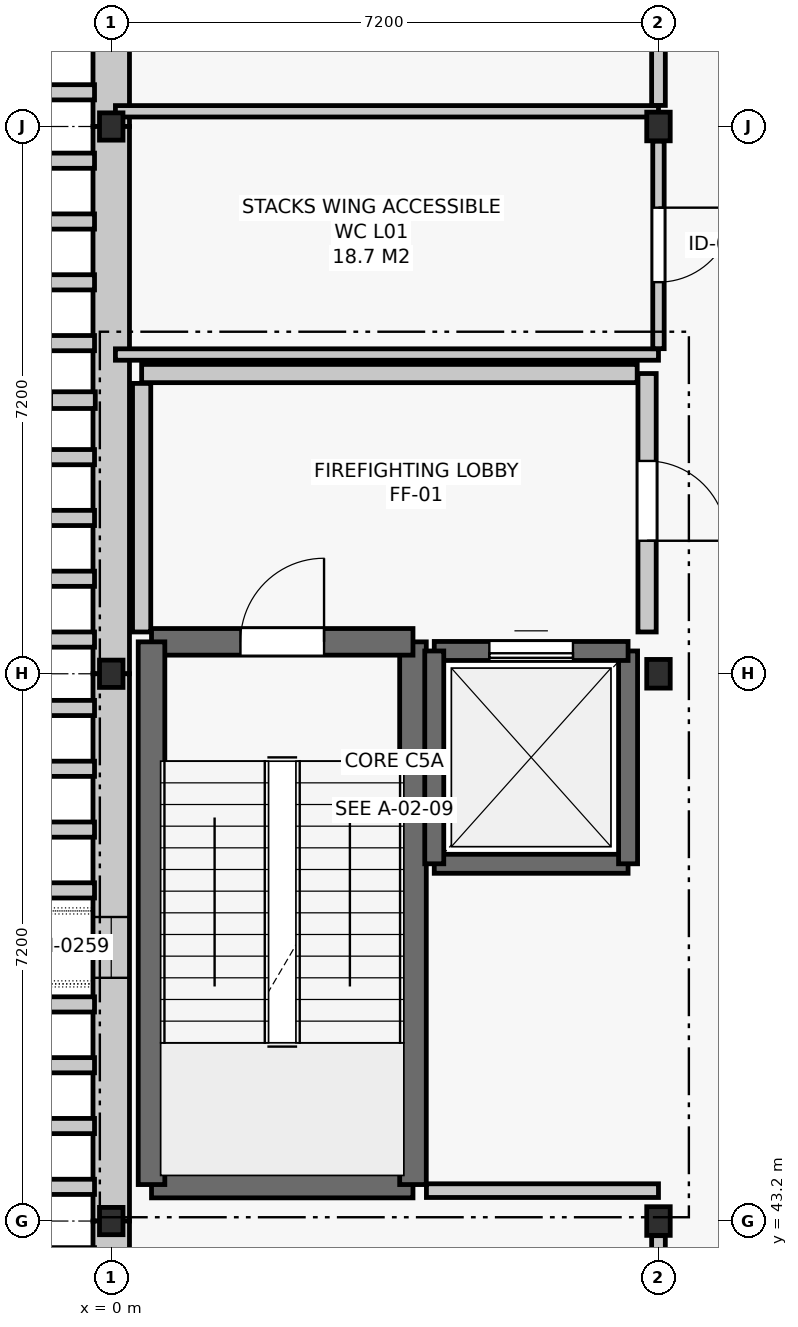
"""IFC4 building model, lengths in metres.
Left out: names, types, materials, properties, quantities, classifications, styles, units other than length and angle.
Written with IfcOpenShell. Run it as: python <this file> out.ifc"""

import sys

from ifc_helpers import new_model, si_unit, direction, frame, frame_2d, origin, origin_2d, place, context, subcontext, project, spatial, rectangle, i_section, extrude, element, fill, save


model = new_model("IFC4")
c1 = context("Model", 3, precision=1e-05, world=origin(), true_north=direction((0.0, 1.0)))
c2 = subcontext(c1, "Body", "Model", "MODEL_VIEW")
j1 = project(units=[si_unit("LENGTHUNIT", "METRE"), si_unit("PLANEANGLEUNIT", "RADIAN")], contexts=[c1])
p1 = place(None, origin())
s1 = spatial("IfcSite", under=j1, at=p1, CompositionType="ELEMENT")
p2 = place(p1, origin())
s2 = spatial("IfcBuilding", under=s1, at=p2, CompositionType="ELEMENT")
p3 = place(p2, frame((0.0, 0.0, 5.4)))
s3 = spatial("IfcBuildingStorey", under=s2, at=p3, CompositionType="ELEMENT", Elevation=5.4)
for number, where, z_axis, x_axis in (
    (1, (0.0, 43.2, 0.0), (0.0, 0.0, 1.0), (1.0, 0.0, 0.0)),
    (2, (0.0, 50.4, 0.0), (0.0, 0.0, 1.0), (1.0, 0.0, 0.0)),
    (3, (0.0, 57.6, 0.0), (0.0, 0.0, 1.0), (1.0, 0.0, 0.0)),
):
    element("IfcColumn", number, at=place(p3, frame(where, z_axis=z_axis, x_axis=x_axis)), inside=s3, PredefinedType="COLUMN", context=c2, shape_type="SweptSolid", body=[
        extrude(i_section(OverallWidth=0.309, OverallDepth=0.359, WebThickness=0.021, FlangeThickness=0.035, FilletRadius=0.027, at=origin_2d()), origin(), (0.0, 0.0, 1.0), 4.8),
    ])
for number, where, z_axis, x_axis in (
    (4, (7.2, 43.2, 0.0), (0.0, 0.0, 1.0), (1.0, 0.0, 0.0)),
    (5, (7.2, 50.4, 0.0), (0.0, 0.0, 1.0), (1.0, 0.0, 0.0)),
    (6, (7.2, 57.6, 0.0), (0.0, 0.0, 1.0), (1.0, 0.0, 0.0)),
):
    element("IfcColumn", number, at=place(p3, frame(where, z_axis=z_axis, x_axis=x_axis)), inside=s3, PredefinedType="COLUMN", context=c2, shape_type="SweptSolid", body=[
        extrude(i_section(OverallWidth=0.309, OverallDepth=0.377, WebThickness=0.021, FlangeThickness=0.036, FilletRadius=0.027, at=origin_2d()), origin(), (0.0, 0.0, 1.0), 4.8),
    ])
p4 = place(p3, frame((0.0, 64.8, 0.0), z_axis=(0.0, 0.0, 1.0), x_axis=(0.0, -1.0, 0.0)))
e7 = element("IfcWall", 7, at=p4, inside=s3, PredefinedType="SOLIDWALL", context=c2, shape_type="SweptSolid", body=[
    extrude(rectangle(XDim=7.2, YDim=0.48, at=frame_2d((3.6, 0.0))), origin(), (0.0, 0.0, 1.0), 3.62),
])
p5 = place(p4, frame((3.2, 0.0, 0.95)))
e8 = element("IfcOpeningElement", 8, at=p5, cuts=e7, PredefinedType="OPENING", context=c2, shape_type="SweptSolid", body=[
    extrude(rectangle(XDim=0.8, YDim=2.15, at=frame_2d((0.4, 1.075))), frame((0.0, 0.252, 0.0), z_axis=(0.0, -1.0, 0.0), x_axis=(1.0, 0.0, 0.0)), (0.0, 0.0, 1.0), 0.504),
])
p6 = place(p3, frame((0.0, 57.6, 0.0), z_axis=(0.0, 0.0, 1.0), x_axis=(0.0, -1.0, 0.0)))
e9 = element("IfcWall", 9, at=p6, inside=s3, PredefinedType="SOLIDWALL", context=c2, shape_type="SweptSolid", body=[
    extrude(rectangle(XDim=7.2, YDim=0.48, at=frame_2d((3.6, 0.0))), origin(), (0.0, 0.0, 1.0), 3.62),
])
p7 = place(p3, frame((0.0, 50.4, 0.0), z_axis=(0.0, 0.0, 1.0), x_axis=(0.0, -1.0, 0.0)))
e10 = element("IfcWall", 10, at=p7, inside=s3, PredefinedType="SOLIDWALL", context=c2, shape_type="SweptSolid", body=[
    extrude(rectangle(XDim=7.2, YDim=0.48, at=frame_2d((3.6, 0.0))), origin(), (0.0, 0.0, 1.0), 3.62),
])
p8 = place(p7, frame((3.2, 0.0, 0.95)))
e11 = element("IfcOpeningElement", 11, at=p8, cuts=e10, PredefinedType="OPENING", context=c2, shape_type="SweptSolid", body=[
    extrude(rectangle(XDim=0.8, YDim=2.15, at=frame_2d((0.4, 1.075))), frame((0.0, 0.252, 0.0), z_axis=(0.0, -1.0, 0.0), x_axis=(1.0, 0.0, 0.0)), (0.0, 0.0, 1.0), 0.504),
])
p9 = place(p3, frame((0.0, 43.2, 0.0), z_axis=(0.0, 0.0, 1.0), x_axis=(0.0, -1.0, 0.0)))
e12 = element("IfcWall", 12, at=p9, inside=s3, PredefinedType="SOLIDWALL", context=c2, shape_type="SweptSolid", body=[
    extrude(rectangle(XDim=7.2, YDim=0.48, at=frame_2d((3.6, 0.0))), origin(), (0.0, 0.0, 1.0), 3.62),
])
p10 = place(p9, frame((3.2, 0.0, 0.95)))
e13 = element("IfcOpeningElement", 13, at=p10, cuts=e12, PredefinedType="OPENING", context=c2, shape_type="SweptSolid", body=[
    extrude(rectangle(XDim=0.8, YDim=2.15, at=frame_2d((0.4, 1.075))), frame((0.0, 0.252, 0.0), z_axis=(0.0, -1.0, 0.0), x_axis=(1.0, 0.0, 0.0)), (0.0, 0.0, 1.0), 0.504),
])
for number, where, z_axis, x_axis in (
    (14, (-1.66, 43.65, 0.0), (0.0, 0.0, 1.0), (1.0, 0.0, 0.0)),
    (15, (-1.66, 44.45, 0.0), (0.0, 0.0, 1.0), (1.0, 0.0, 0.0)),
    (16, (-1.66, 45.25, 0.0), (0.0, 0.0, 1.0), (1.0, 0.0, 0.0)),
    (17, (-1.66, 46.05, 0.0), (0.0, 0.0, 1.0), (1.0, 0.0, 0.0)),
    (18, (-1.66, 47.55, 0.0), (0.0, 0.0, 1.0), (1.0, 0.0, 0.0)),
    (19, (-1.66, 48.35, 0.0), (0.0, 0.0, 1.0), (1.0, 0.0, 0.0)),
    (20, (-1.66, 49.15, 0.0), (0.0, 0.0, 1.0), (1.0, 0.0, 0.0)),
    (21, (-1.66, 49.95, 0.0), (0.0, 0.0, 1.0), (1.0, 0.0, 0.0)),
    (22, (-1.66, 50.85, 0.0), (0.0, 0.0, 1.0), (1.0, 0.0, 0.0)),
    (23, (-1.66, 51.65, 0.0), (0.0, 0.0, 1.0), (1.0, 0.0, 0.0)),
    (24, (-1.66, 52.45, 0.0), (0.0, 0.0, 1.0), (1.0, 0.0, 0.0)),
    (25, (-1.66, 53.25, 0.0), (0.0, 0.0, 1.0), (1.0, 0.0, 0.0)),
    (26, (-1.66, 54.75, 0.0), (0.0, 0.0, 1.0), (1.0, 0.0, 0.0)),
    (27, (-1.66, 55.55, 0.0), (0.0, 0.0, 1.0), (1.0, 0.0, 0.0)),
    (28, (-1.66, 56.35, 0.0), (0.0, 0.0, 1.0), (1.0, 0.0, 0.0)),
    (29, (-1.66, 57.15, 0.0), (0.0, 0.0, 1.0), (1.0, 0.0, 0.0)),
    (30, (-1.66, 58.05, 0.0), (0.0, 0.0, 1.0), (1.0, 0.0, 0.0)),
):
    element("IfcWall", number, at=place(p3, frame(where, z_axis=z_axis, x_axis=x_axis)), inside=s3, PredefinedType="SOLIDWALL", context=c2, shape_type="SweptSolid", body=[
        extrude(rectangle(XDim=1.44, YDim=0.2, at=frame_2d((0.72, 0.0))), origin(), (0.0, 0.0, 1.0), 4.8),
    ])
p11 = place(p3, frame((0.53, 43.68, 0.0), z_axis=(0.0, 0.0, 1.0), x_axis=(1.0, 0.0, 0.0)))
e31 = element("IfcWall", 31, at=p11, inside=s3, PredefinedType="SHEAR", context=c2, shape_type="SweptSolid", body=[
    extrude(rectangle(XDim=3.44, YDim=0.35, at=frame_2d((1.72, 0.0))), origin(), (0.0, 0.0, 1.0), 4.5),
])
p12 = place(p3, frame((3.97, 43.68, 0.0), z_axis=(0.0, 0.0, 1.0), x_axis=(0.0, 1.0, 0.0)))
e32 = element("IfcWall", 32, at=p12, inside=s3, PredefinedType="SHEAR", context=c2, shape_type="SweptSolid", body=[
    extrude(rectangle(XDim=7.14, YDim=0.35, at=frame_2d((3.57, 0.0))), origin(), (0.0, 0.0, 1.0), 4.5),
])
p13 = place(p3, frame((3.97, 50.82, 0.0), z_axis=(0.0, 0.0, 1.0), x_axis=(-1.0, 0.0, 0.0)))
e33 = element("IfcWall", 33, at=p13, inside=s3, PredefinedType="SHEAR", context=c2, shape_type="SweptSolid", body=[
    extrude(rectangle(XDim=3.44, YDim=0.35, at=frame_2d((1.72, 0.0))), origin(), (0.0, 0.0, 1.0), 4.5),
])
p14 = place(p13, frame((1.17, 0.0, 0.0)))
e34 = element("IfcOpeningElement", 34, at=p14, cuts=e33, PredefinedType="OPENING", context=c2, shape_type="SweptSolid", body=[
    extrude(rectangle(XDim=1.1, YDim=2.15, at=frame_2d((0.55, 1.075))), frame((0.0, 0.187, 0.0), z_axis=(0.0, -1.0, 0.0), x_axis=(1.0, 0.0, 0.0)), (0.0, 0.0, 1.0), 0.374),
])
p15 = place(p3, frame((0.53, 50.82, 0.0), z_axis=(0.0, 0.0, 1.0), x_axis=(0.0, -1.0, 0.0)))
e35 = element("IfcWall", 35, at=p15, inside=s3, PredefinedType="SHEAR", context=c2, shape_type="SweptSolid", body=[
    extrude(rectangle(XDim=7.14, YDim=0.35, at=frame_2d((3.57, 0.0))), origin(), (0.0, 0.0, 1.0), 4.5),
])
p16 = place(p3, frame((7.05, 50.95, 0.0), z_axis=(0.0, 0.0, 1.0), x_axis=(0.0, 1.0, 0.0)))
e36 = element("IfcWall", 36, at=p16, inside=s3, PredefinedType="SOLIDWALL", context=c2, shape_type="SweptSolid", body=[
    extrude(rectangle(XDim=3.4, YDim=0.24, at=frame_2d((1.7, 0.0))), origin(), (0.0, 0.0, 1.0), 3.76),
])
p17 = place(p16, frame((1.2, 0.0, 0.0)))
e37 = element("IfcOpeningElement", 37, at=p17, cuts=e36, PredefinedType="OPENING", context=c2, shape_type="SweptSolid", body=[
    extrude(rectangle(XDim=1.05, YDim=2.15, at=frame_2d((0.525, 1.075))), frame((0.0, 0.132, 0.0), z_axis=(0.0, -1.0, 0.0), x_axis=(1.0, 0.0, 0.0)), (0.0, 0.0, 1.0), 0.264),
])
p18 = place(p3, frame((0.4, 54.35, 0.0), z_axis=(0.0, 0.0, 1.0), x_axis=(1.0, 0.0, 0.0)))
e38 = element("IfcWall", 38, at=p18, inside=s3, PredefinedType="SOLIDWALL", context=c2, shape_type="SweptSolid", body=[
    extrude(rectangle(XDim=6.52, YDim=0.24, at=frame_2d((3.26, 0.0))), origin(), (0.0, 0.0, 1.0), 3.76),
])
p19 = place(p3, frame((0.4, 50.95, 0.0), z_axis=(0.0, 0.0, 1.0), x_axis=(0.0, 1.0, 0.0)))
e39 = element("IfcWall", 39, at=p19, inside=s3, PredefinedType="SOLIDWALL", context=c2, shape_type="SweptSolid", body=[
    extrude(rectangle(XDim=3.27, YDim=0.24, at=frame_2d((1.635, 0.0))), origin(), (0.0, 0.0, 1.0), 3.76),
])
p20 = place(p3, frame((4.25, 47.9, 0.0), z_axis=(0.0, 0.0, 1.0), x_axis=(1.0, 0.0, 0.0)))
e40 = element("IfcWall", 40, at=p20, inside=s3, PredefinedType="SHEAR", context=c2, shape_type="SweptSolid", body=[
    extrude(rectangle(XDim=2.55, YDim=0.25, at=frame_2d((1.275, 0.0))), origin(), (0.0, 0.0, 1.0), 4.5),
])
p21 = place(p3, frame((6.8, 47.9, 0.0), z_axis=(0.0, 0.0, 1.0), x_axis=(0.0, 1.0, 0.0)))
e41 = element("IfcWall", 41, at=p21, inside=s3, PredefinedType="SHEAR", context=c2, shape_type="SweptSolid", body=[
    extrude(rectangle(XDim=2.8, YDim=0.25, at=frame_2d((1.4, 0.0))), origin(), (0.0, 0.0, 1.0), 4.5),
])
p22 = place(p3, frame((6.8, 50.7, 0.0), z_axis=(0.0, 0.0, 1.0), x_axis=(-1.0, 0.0, 0.0)))
e42 = element("IfcWall", 42, at=p22, inside=s3, PredefinedType="SHEAR", context=c2, shape_type="SweptSolid", body=[
    extrude(rectangle(XDim=2.55, YDim=0.25, at=frame_2d((1.275, 0.0))), origin(), (0.0, 0.0, 1.0), 4.5),
])
p23 = place(p22, frame((0.725, 0.0, 0.0)))
e43 = element("IfcOpeningElement", 43, at=p23, cuts=e42, PredefinedType="OPENING", context=c2, shape_type="SweptSolid", body=[
    extrude(rectangle(XDim=1.1, YDim=2.1, at=frame_2d((0.55, 1.05))), frame((0.0, 0.137, 0.0), z_axis=(0.0, -1.0, 0.0), x_axis=(1.0, 0.0, 0.0)), (0.0, 0.0, 1.0), 0.274),
])
p24 = place(p3, frame((4.25, 50.7, 0.0), z_axis=(0.0, 0.0, 1.0), x_axis=(0.0, -1.0, 0.0)))
e44 = element("IfcWall", 44, at=p24, inside=s3, PredefinedType="SHEAR", context=c2, shape_type="SweptSolid", body=[
    extrude(rectangle(XDim=2.8, YDim=0.25, at=frame_2d((1.4, 0.0))), origin(), (0.0, 0.0, 1.0), 4.5),
])
for number, where, z_axis, x_axis in (
    (45, (0.055, 54.6, 0.0), (0.0, 0.0, 1.0), (1.0, 0.0, 0.0)),
    (46, (0.055, 57.8, 0.0), (0.0, 0.0, 1.0), (1.0, 0.0, 0.0)),
):
    element("IfcWall", number, at=place(p3, frame(where, z_axis=z_axis, x_axis=x_axis)), inside=s3, PredefinedType="PARTITIONING", context=c2, shape_type="SweptSolid", body=[
        extrude(rectangle(XDim=7.145, YDim=0.15, at=frame_2d((3.573, 0.0))), origin(), (0.0, 0.0, 1.0), 3.732),
    ])
p25 = place(p3, frame((4.147, 43.6, 0.0), z_axis=(0.0, 0.0, 1.0), x_axis=(1.0, 0.0, 0.0)))
e47 = element("IfcWall", 47, at=p25, inside=s3, PredefinedType="PARTITIONING", context=c2, shape_type="SweptSolid", body=[
    extrude(rectangle(XDim=3.053, YDim=0.18, at=frame_2d((1.526, 0.0))), origin(), (0.0, 0.0, 1.0), 3.945),
])
p26 = place(p3, frame((7.2, 54.677, 0.0), z_axis=(0.0, 0.0, 1.0), x_axis=(0.0, 1.0, 0.0)))
e48 = element("IfcWall", 48, at=p26, inside=s3, PredefinedType="PARTITIONING", context=c2, shape_type="SweptSolid", body=[
    extrude(rectangle(XDim=2.73, YDim=0.15, at=frame_2d((1.365, 0.0))), origin(), (0.0, 0.0, 1.0), 3.945),
])
p27 = place(p26, frame((0.875, 0.0, 0.0)))
e49 = element("IfcOpeningElement", 49, at=p27, cuts=e48, PredefinedType="OPENING", context=c2, shape_type="SweptSolid", body=[
    extrude(rectangle(XDim=0.98, YDim=2.1, at=frame_2d((0.49, 1.05))), frame((0.0, 0.087, 0.0), z_axis=(0.0, -1.0, 0.0), x_axis=(1.0, 0.0, 0.0)), (0.0, 0.0, 1.0), 0.174),
])
p28 = place(p3, frame((7.2, 36.192, 0.0), z_axis=(0.0, 0.0, 1.0), x_axis=(0.0, 1.0, 0.0)))
e50 = element("IfcWall", 50, at=p28, inside=s3, PredefinedType="PARTITIONING", context=c2, shape_type="SweptSolid", body=[
    extrude(rectangle(XDim=6.815, YDim=0.18, at=frame_2d((3.408, 0.0))), origin(), (0.0, 0.0, 1.0), 3.945),
])
p29 = place(p3, frame((7.2, 57.877, 0.0), z_axis=(0.0, 0.0, 1.0), x_axis=(0.0, 1.0, 0.0)))
e51 = element("IfcWall", 51, at=p29, inside=s3, PredefinedType="PARTITIONING", context=c2, shape_type="SweptSolid", body=[
    extrude(rectangle(XDim=6.73, YDim=0.18, at=frame_2d((3.365, 0.0))), origin(), (0.0, 0.0, 1.0), 3.945),
])
p30 = place(p8, origin())
e52 = element("IfcWindow", 52, at=p30, inside=s3, PartitioningType="SINGLE_PANEL", PredefinedType="WINDOW", context=c2, shape_type="SweptSolid", body=[
    extrude(rectangle(XDim=0.8, YDim=2.15, at=frame_2d((0.4, 1.075))), frame((0.0, 0.03, 0.0), z_axis=(0.0, -1.0, 0.0), x_axis=(1.0, 0.0, 0.0)), (0.0, 0.0, 1.0), 0.06),
])
fill(e11, e52)
p31 = place(p14, frame((1.1, 0.0, 0.0), z_axis=(0.0, 0.0, 1.0), x_axis=(-1.0, 0.0, 0.0)))
e53 = element("IfcDoor", 53, at=p31, inside=s3, OperationType="SINGLE_SWING_RIGHT", PredefinedType="DOOR", context=c2, shape_type="SweptSolid", body=[
    extrude(rectangle(XDim=1.1, YDim=2.15, at=frame_2d((0.55, 1.075))), frame((0.0, 0.025, 0.0), z_axis=(0.0, -1.0, 0.0), x_axis=(1.0, 0.0, 0.0)), (0.0, 0.0, 1.0), 0.05),
])
fill(e34, e53)
p32 = place(p17, frame((1.05, 0.0, 0.0), z_axis=(0.0, 0.0, 1.0), x_axis=(-1.0, 0.0, 0.0)))
e54 = element("IfcDoor", 54, at=p32, inside=s3, OperationType="SINGLE_SWING_RIGHT", PredefinedType="DOOR", context=c2, shape_type="SweptSolid", body=[
    extrude(rectangle(XDim=1.05, YDim=2.15, at=frame_2d((0.525, 1.075))), frame((0.0, 0.025, 0.0), z_axis=(0.0, -1.0, 0.0), x_axis=(1.0, 0.0, 0.0)), (0.0, 0.0, 1.0), 0.05),
])
fill(e37, e54)
p33 = place(p23, origin())
e55 = element("IfcDoor", 55, at=p33, inside=s3, OperationType="SLIDING_TO_RIGHT", PredefinedType="DOOR", context=c2, shape_type="SweptSolid", body=[
    extrude(rectangle(XDim=1.1, YDim=2.1, at=frame_2d((0.55, 1.05))), frame((0.0, 0.025, 0.0), z_axis=(0.0, -1.0, 0.0), x_axis=(1.0, 0.0, 0.0)), (0.0, 0.0, 1.0), 0.05),
])
fill(e43, e55)
p34 = place(p27, frame((0.98, 0.0, 0.0), z_axis=(0.0, 0.0, 1.0), x_axis=(-1.0, 0.0, 0.0)))
e56 = element("IfcDoor", 56, at=p34, inside=s3, OperationType="SINGLE_SWING_LEFT", PredefinedType="DOOR", context=c2, shape_type="SweptSolid", body=[
    extrude(rectangle(XDim=0.98, YDim=2.1, at=frame_2d((0.49, 1.05))), frame((0.0, 0.025, 0.0), z_axis=(0.0, -1.0, 0.0), x_axis=(1.0, 0.0, 0.0)), (0.0, 0.0, 1.0), 0.05),
])
fill(e49, e56)
save(model, sys.argv[1])
